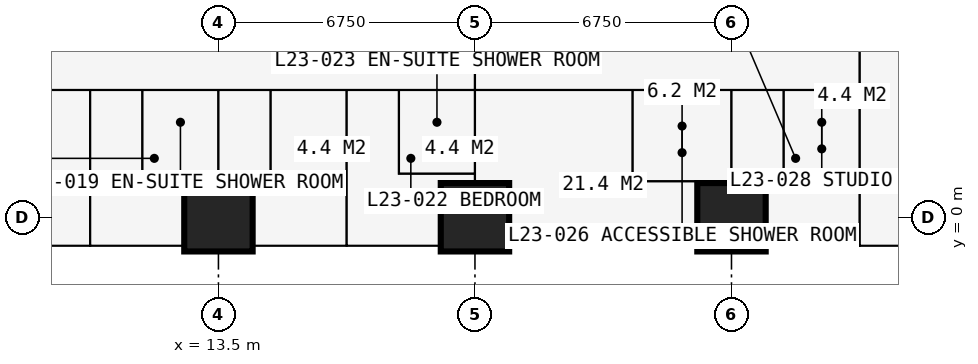
"""IFC4 building model, lengths in metres.
Left out: names, types, materials, properties, quantities, classifications, styles, units other than length and angle.
Written with IfcOpenShell. Run it as: python <this file> out.ifc"""

import sys

from ifc_helpers import new_model, si_unit, direction, frame, frame_2d, origin, origin_2d, place, context, subcontext, project, spatial, rectangle, extrude, element, fill, save


model = new_model("IFC4")
c1 = context("Model", 3, precision=1e-05, world=origin(), true_north=direction((0.0, 1.0)))
c2 = subcontext(c1, "Body", "Model", "MODEL_VIEW")
j1 = project(units=[si_unit("LENGTHUNIT", "METRE"), si_unit("PLANEANGLEUNIT", "RADIAN")], contexts=[c1])
p1 = place(None, origin())
s1 = spatial("IfcSite", under=j1, at=p1, CompositionType="ELEMENT")
p2 = place(p1, origin())
s2 = spatial("IfcBuilding", under=s1, at=p2, CompositionType="ELEMENT")
p3 = place(p2, frame((0.0, 0.0, 87.3)))
s3 = spatial("IfcBuildingStorey", under=s2, at=p3, CompositionType="ELEMENT", Elevation=87.3)
for number, where, z_axis, x_axis in (
    (1, (13.5, 0.0, 0.0), (0.0, 0.0, 1.0), (1.0, 0.0, 0.0)),
    (2, (20.25, 0.0, 0.0), (0.0, 0.0, 1.0), (1.0, 0.0, 0.0)),
    (3, (27.0, 0.0, 0.0), (0.0, 0.0, 1.0), (1.0, 0.0, 0.0)),
):
    element("IfcColumn", number, at=place(p3, frame(where, z_axis=z_axis, x_axis=x_axis)), inside=s3, PredefinedType="COLUMN", context=c2, shape_type="SweptSolid", body=[
        extrude(rectangle(XDim=1.8, YDim=1.8, at=origin_2d()), origin(), (0.0, 0.0, 1.0), 3.6),
    ])
p4 = place(p3, frame((20.25, -0.75, 0.0), z_axis=(0.0, 0.0, 1.0), x_axis=(-1.0, 0.0, 0.0)))
e4 = element("IfcWall", 4, at=p4, inside=s3, PredefinedType="SOLIDWALL", context=c2, shape_type="SweptSolid", body=[
    extrude(rectangle(XDim=6.75, YDim=0.15, at=frame_2d((3.375, 0.0))), origin(), (0.0, 0.0, 1.0), 3.375),
])
p5 = place(p4, frame((0.962, 0.0, 0.0)))
e5 = element("IfcOpeningElement", 5, at=p5, cuts=e4, PredefinedType="OPENING", context=c2, shape_type="SweptSolid", body=[
    extrude(rectangle(XDim=1.0, YDim=2.2, at=frame_2d((0.5, 1.1))), frame((0.0, 0.085, 0.0), z_axis=(0.0, -1.0, 0.0), x_axis=(1.0, 0.0, 0.0)), (0.0, 0.0, 1.0), 0.17),
])
p6 = place(p4, frame((2.025, 0.0, 0.9)))
e6 = element("IfcOpeningElement", 6, at=p6, cuts=e4, PredefinedType="OPENING", context=c2, shape_type="SweptSolid", body=[
    extrude(rectangle(XDim=1.2, YDim=1.8, at=frame_2d((0.6, 0.9))), frame((0.0, 0.085, 0.0), z_axis=(0.0, -1.0, 0.0), x_axis=(1.0, 0.0, 0.0)), (0.0, 0.0, 1.0), 0.17),
])
p7 = place(p4, frame((4.788, 0.0, 0.0)))
e7 = element("IfcOpeningElement", 7, at=p7, cuts=e4, PredefinedType="OPENING", context=c2, shape_type="SweptSolid", body=[
    extrude(rectangle(XDim=1.0, YDim=2.2, at=frame_2d((0.5, 1.1))), frame((0.0, 0.085, 0.0), z_axis=(0.0, -1.0, 0.0), x_axis=(1.0, 0.0, 0.0)), (0.0, 0.0, 1.0), 0.17),
])
p8 = place(p4, frame((3.525, 0.0, 0.9)))
e8 = element("IfcOpeningElement", 8, at=p8, cuts=e4, PredefinedType="OPENING", context=c2, shape_type="SweptSolid", body=[
    extrude(rectangle(XDim=1.2, YDim=1.8, at=frame_2d((0.6, 0.9))), frame((0.0, 0.085, 0.0), z_axis=(0.0, -1.0, 0.0), x_axis=(1.0, 0.0, 0.0)), (0.0, 0.0, 1.0), 0.17),
])
p9 = place(p3, frame((16.875, -0.85, 0.0), z_axis=(0.0, 0.0, 1.0), x_axis=(0.0, -1.0, 0.0)))
e9 = element("IfcWall", 9, at=p9, inside=s3, PredefinedType="USERDEFINED", context=c2, shape_type="SweptSolid", body=[
    extrude(rectangle(XDim=2.2, YDim=1.0, at=frame_2d((1.1, 0.0))), origin(), (0.0, 0.0, 1.0), 0.9),
])
p10 = place(p3, frame((6.75, 3.35, 0.0), z_axis=(0.0, 0.0, 1.0), x_axis=(1.0, 0.0, 0.0)))
e10 = element("IfcWall", 10, at=p10, inside=s3, PredefinedType="PARTITIONING", context=c2, shape_type="SweptSolid", body=[
    extrude(rectangle(XDim=23.625, YDim=0.1, at=frame_2d((11.812, 0.0))), origin(), (0.0, 0.0, 1.0), 3.375),
])
p11 = place(p10, frame((1.2, 0.0, 0.0)))
e11 = element("IfcOpeningElement", 11, at=p11, cuts=e10, PredefinedType="OPENING", context=c2, shape_type="SweptSolid", body=[
    extrude(rectangle(XDim=1.0, YDim=2.2, at=frame_2d((0.5, 1.1))), frame((0.0, 0.06, 0.0), z_axis=(0.0, -1.0, 0.0), x_axis=(1.0, 0.0, 0.0)), (0.0, 0.0, 1.0), 0.12),
])
p12 = place(p10, frame((3.575, 0.0, 0.0)))
e12 = element("IfcOpeningElement", 12, at=p12, cuts=e10, PredefinedType="OPENING", context=c2, shape_type="SweptSolid", body=[
    extrude(rectangle(XDim=0.95, YDim=2.2, at=frame_2d((0.475, 1.1))), frame((0.0, 0.06, 0.0), z_axis=(0.0, -1.0, 0.0), x_axis=(1.0, 0.0, 0.0)), (0.0, 0.0, 1.0), 0.12),
])
p13 = place(p10, frame((6.95, 0.0, 0.0)))
e13 = element("IfcOpeningElement", 13, at=p13, cuts=e10, PredefinedType="OPENING", context=c2, shape_type="SweptSolid", body=[
    extrude(rectangle(XDim=0.95, YDim=2.2, at=frame_2d((0.475, 1.1))), frame((0.0, 0.06, 0.0), z_axis=(0.0, -1.0, 0.0), x_axis=(1.0, 0.0, 0.0)), (0.0, 0.0, 1.0), 0.12),
])
p14 = place(p10, frame((10.325, 0.0, 0.0)))
e14 = element("IfcOpeningElement", 14, at=p14, cuts=e10, PredefinedType="OPENING", context=c2, shape_type="SweptSolid", body=[
    extrude(rectangle(XDim=0.95, YDim=2.2, at=frame_2d((0.475, 1.1))), frame((0.0, 0.06, 0.0), z_axis=(0.0, -1.0, 0.0), x_axis=(1.0, 0.0, 0.0)), (0.0, 0.0, 1.0), 0.12),
])
p15 = place(p10, frame((15.1, 0.0, 0.0)))
e15 = element("IfcOpeningElement", 15, at=p15, cuts=e10, PredefinedType="OPENING", context=c2, shape_type="SweptSolid", body=[
    extrude(rectangle(XDim=0.95, YDim=2.2, at=frame_2d((0.475, 1.1))), frame((0.0, 0.06, 0.0), z_axis=(0.0, -1.0, 0.0), x_axis=(1.0, 0.0, 0.0)), (0.0, 0.0, 1.0), 0.12),
])
p16 = place(p10, frame((20.45, 0.0, 0.0)))
e16 = element("IfcOpeningElement", 16, at=p16, cuts=e10, PredefinedType="OPENING", context=c2, shape_type="SweptSolid", body=[
    extrude(rectangle(XDim=0.95, YDim=2.2, at=frame_2d((0.475, 1.1))), frame((0.0, 0.06, 0.0), z_axis=(0.0, -1.0, 0.0), x_axis=(1.0, 0.0, 0.0)), (0.0, 0.0, 1.0), 0.12),
])
p17 = place(p3, frame((10.125, -0.734, 0.0), z_axis=(0.0, 0.0, 1.0), x_axis=(0.0, 1.0, 0.0)))
e17 = element("IfcWall", 17, at=p17, inside=s3, PredefinedType="PARTITIONING", context=c2, shape_type="SweptSolid", body=[
    extrude(rectangle(XDim=4.084, YDim=0.15, at=frame_2d((2.042, 0.0))), origin(), (0.0, 0.0, 1.0), 3.375),
])
p18 = place(p3, frame((11.5, 1.15, 0.0), z_axis=(0.0, 0.0, 1.0), x_axis=(0.0, 1.0, 0.0)))
e18 = element("IfcWall", 18, at=p18, inside=s3, PredefinedType="PARTITIONING", context=c2, shape_type="SweptSolid", body=[
    extrude(rectangle(XDim=2.2, YDim=0.1, at=frame_2d((1.1, 0.0))), origin(), (0.0, 0.0, 1.0), 3.375),
])
p19 = place(p18, frame((0.65, 0.0, 0.0)))
e19 = element("IfcOpeningElement", 19, at=p19, cuts=e18, PredefinedType="OPENING", context=c2, shape_type="SweptSolid", body=[
    extrude(rectangle(XDim=0.9, YDim=2.2, at=frame_2d((0.45, 1.1))), frame((0.0, 0.06, 0.0), z_axis=(0.0, -1.0, 0.0), x_axis=(1.0, 0.0, 0.0)), (0.0, 0.0, 1.0), 0.12),
])
p20 = place(p3, frame((11.5, 1.15, 0.0), z_axis=(0.0, 0.0, 1.0), x_axis=(1.0, 0.0, 0.0)))
e20 = element("IfcWall", 20, at=p20, inside=s3, PredefinedType="PARTITIONING", context=c2, shape_type="SweptSolid", body=[
    extrude(rectangle(XDim=2.0, YDim=0.1, at=frame_2d((1.0, 0.0))), origin(), (0.0, 0.0, 1.0), 3.375),
])
p21 = place(p3, frame((13.5, -0.734, 0.0), z_axis=(0.0, 0.0, 1.0), x_axis=(0.0, 1.0, 0.0)))
e21 = element("IfcWall", 21, at=p21, inside=s3, PredefinedType="PARTITIONING", context=c2, shape_type="SweptSolid", body=[
    extrude(rectangle(XDim=4.084, YDim=0.1, at=frame_2d((2.042, 0.0))), origin(), (0.0, 0.0, 1.0), 2.877),
])
p22 = place(p3, frame((14.875, 1.15, 0.0), z_axis=(0.0, 0.0, 1.0), x_axis=(0.0, 1.0, 0.0)))
e22 = element("IfcWall", 22, at=p22, inside=s3, PredefinedType="PARTITIONING", context=c2, shape_type="SweptSolid", body=[
    extrude(rectangle(XDim=2.2, YDim=0.1, at=frame_2d((1.1, 0.0))), origin(), (0.0, 0.0, 1.0), 3.375),
])
p23 = place(p22, frame((0.65, 0.0, 0.0)))
e23 = element("IfcOpeningElement", 23, at=p23, cuts=e22, PredefinedType="OPENING", context=c2, shape_type="SweptSolid", body=[
    extrude(rectangle(XDim=0.9, YDim=2.2, at=frame_2d((0.45, 1.1))), frame((0.0, 0.06, 0.0), z_axis=(0.0, -1.0, 0.0), x_axis=(1.0, 0.0, 0.0)), (0.0, 0.0, 1.0), 0.12),
])
p24 = place(p3, frame((14.875, 1.15, 0.0), z_axis=(0.0, 0.0, 1.0), x_axis=(1.0, 0.0, 0.0)))
e24 = element("IfcWall", 24, at=p24, inside=s3, PredefinedType="PARTITIONING", context=c2, shape_type="SweptSolid", body=[
    extrude(rectangle(XDim=2.0, YDim=0.1, at=frame_2d((1.0, 0.0))), origin(), (0.0, 0.0, 1.0), 3.375),
])
p25 = place(p3, frame((16.875, -0.734, 0.0), z_axis=(0.0, 0.0, 1.0), x_axis=(0.0, 1.0, 0.0)))
e25 = element("IfcWall", 25, at=p25, inside=s3, PredefinedType="PARTITIONING", context=c2, shape_type="SweptSolid", body=[
    extrude(rectangle(XDim=4.084, YDim=0.1, at=frame_2d((2.042, 0.0))), origin(), (0.0, 0.0, 1.0), 3.375),
])
p26 = place(p3, frame((18.25, 1.15, 0.0), z_axis=(0.0, 0.0, 1.0), x_axis=(0.0, 1.0, 0.0)))
e26 = element("IfcWall", 26, at=p26, inside=s3, PredefinedType="PARTITIONING", context=c2, shape_type="SweptSolid", body=[
    extrude(rectangle(XDim=2.2, YDim=0.1, at=frame_2d((1.1, 0.0))), origin(), (0.0, 0.0, 1.0), 3.375),
])
p27 = place(p26, frame((0.65, 0.0, 0.0)))
e27 = element("IfcOpeningElement", 27, at=p27, cuts=e26, PredefinedType="OPENING", context=c2, shape_type="SweptSolid", body=[
    extrude(rectangle(XDim=0.9, YDim=2.2, at=frame_2d((0.45, 1.1))), frame((0.0, 0.06, 0.0), z_axis=(0.0, -1.0, 0.0), x_axis=(1.0, 0.0, 0.0)), (0.0, 0.0, 1.0), 0.12),
])
p28 = place(p3, frame((18.25, 1.15, 0.0), z_axis=(0.0, 0.0, 1.0), x_axis=(1.0, 0.0, 0.0)))
e28 = element("IfcWall", 28, at=p28, inside=s3, PredefinedType="PARTITIONING", context=c2, shape_type="SweptSolid", body=[
    extrude(rectangle(XDim=2.0, YDim=0.1, at=frame_2d((1.0, 0.0))), origin(), (0.0, 0.0, 1.0), 3.375),
])
p29 = place(p3, frame((20.25, -0.734, 0.0), z_axis=(0.0, 0.0, 1.0), x_axis=(0.0, 1.0, 0.0)))
e29 = element("IfcWall", 29, at=p29, inside=s3, PredefinedType="PARTITIONING", context=c2, shape_type="SweptSolid", body=[
    extrude(rectangle(XDim=12.034, YDim=0.15, at=frame_2d((6.017, 0.0))), origin(), (0.0, 0.0, 1.0), 2.61),
])
p30 = place(p3, frame((24.4, 0.95, 0.0), z_axis=(0.0, 0.0, 1.0), x_axis=(0.0, 1.0, 0.0)))
e30 = element("IfcWall", 30, at=p30, inside=s3, PredefinedType="PARTITIONING", context=c2, shape_type="SweptSolid", body=[
    extrude(rectangle(XDim=2.4, YDim=0.1, at=frame_2d((1.2, 0.0))), origin(), (0.0, 0.0, 1.0), 3.375),
])
p31 = place(p3, frame((24.4, 0.95, 0.0), z_axis=(0.0, 0.0, 1.0), x_axis=(1.0, 0.0, 0.0)))
e31 = element("IfcWall", 31, at=p31, inside=s3, PredefinedType="PARTITIONING", context=c2, shape_type="SweptSolid", body=[
    extrude(rectangle(XDim=2.6, YDim=0.1, at=frame_2d((1.3, 0.0))), origin(), (0.0, 0.0, 1.0), 3.375),
])
p32 = place(p31, frame((0.8, 0.0, 0.0)))
e32 = element("IfcOpeningElement", 32, at=p32, cuts=e31, PredefinedType="OPENING", context=c2, shape_type="SweptSolid", body=[
    extrude(rectangle(XDim=0.9, YDim=2.2, at=frame_2d((0.45, 1.1))), frame((0.0, 0.06, 0.0), z_axis=(0.0, -1.0, 0.0), x_axis=(1.0, 0.0, 0.0)), (0.0, 0.0, 1.0), 0.12),
])
p33 = place(p3, frame((27.0, -0.734, 0.0), z_axis=(0.0, 0.0, 1.0), x_axis=(0.0, 1.0, 0.0)))
e33 = element("IfcWall", 33, at=p33, inside=s3, PredefinedType="PARTITIONING", context=c2, shape_type="SweptSolid", body=[
    extrude(rectangle(XDim=4.084, YDim=0.1, at=frame_2d((2.042, 0.0))), origin(), (0.0, 0.0, 1.0), 2.61),
])
p34 = place(p3, frame((28.375, 1.15, 0.0), z_axis=(0.0, 0.0, 1.0), x_axis=(0.0, 1.0, 0.0)))
e34 = element("IfcWall", 34, at=p34, inside=s3, PredefinedType="PARTITIONING", context=c2, shape_type="SweptSolid", body=[
    extrude(rectangle(XDim=2.2, YDim=0.1, at=frame_2d((1.1, 0.0))), origin(), (0.0, 0.0, 1.0), 3.375),
])
p35 = place(p34, frame((0.65, 0.0, 0.0)))
e35 = element("IfcOpeningElement", 35, at=p35, cuts=e34, PredefinedType="OPENING", context=c2, shape_type="SweptSolid", body=[
    extrude(rectangle(XDim=0.9, YDim=2.2, at=frame_2d((0.45, 1.1))), frame((0.0, 0.06, 0.0), z_axis=(0.0, -1.0, 0.0), x_axis=(1.0, 0.0, 0.0)), (0.0, 0.0, 1.0), 0.12),
])
p36 = place(p3, frame((28.375, 1.15, 0.0), z_axis=(0.0, 0.0, 1.0), x_axis=(1.0, 0.0, 0.0)))
e36 = element("IfcWall", 36, at=p36, inside=s3, PredefinedType="PARTITIONING", context=c2, shape_type="SweptSolid", body=[
    extrude(rectangle(XDim=2.0, YDim=0.1, at=frame_2d((1.0, 0.0))), origin(), (0.0, 0.0, 1.0), 3.375),
])
p37 = place(p3, frame((30.375, -0.734, 0.0), z_axis=(0.0, 0.0, 1.0), x_axis=(0.0, 1.0, 0.0)))
e37 = element("IfcWall", 37, at=p37, inside=s3, PredefinedType="PARTITIONING", context=c2, shape_type="SweptSolid", body=[
    extrude(rectangle(XDim=12.034, YDim=0.15, at=frame_2d((6.017, 0.0))), origin(), (0.0, 0.0, 1.0), 3.375),
])
p38 = place(p37, frame((4.884, 0.0, 0.0)))
e38 = element("IfcOpeningElement", 38, at=p38, cuts=e37, PredefinedType="OPENING", context=c2, shape_type="SweptSolid", body=[
    extrude(rectangle(XDim=1.0, YDim=2.2, at=frame_2d((0.5, 1.1))), frame((0.0, 0.085, 0.0), z_axis=(0.0, -1.0, 0.0), x_axis=(1.0, 0.0, 0.0)), (0.0, 0.0, 1.0), 0.17),
])
p39 = place(p5, origin())
e39 = element("IfcDoor", 39, at=p39, inside=s3, OperationType="SINGLE_SWING_LEFT", PredefinedType="DOOR", context=c2, shape_type="SweptSolid", body=[
    extrude(rectangle(XDim=1.0, YDim=2.2, at=frame_2d((0.5, 1.1))), frame((0.0, 0.025, 0.0), z_axis=(0.0, -1.0, 0.0), x_axis=(1.0, 0.0, 0.0)), (0.0, 0.0, 1.0), 0.05),
])
fill(e5, e39)
p40 = place(p6, origin())
e40 = element("IfcWindow", 40, at=p40, inside=s3, PartitioningType="SINGLE_PANEL", PredefinedType="WINDOW", context=c2, shape_type="SweptSolid", body=[
    extrude(rectangle(XDim=1.2, YDim=1.8, at=frame_2d((0.6, 0.9))), frame((0.0, 0.03, 0.0), z_axis=(0.0, -1.0, 0.0), x_axis=(1.0, 0.0, 0.0)), (0.0, 0.0, 1.0), 0.06),
])
fill(e6, e40)
p41 = place(p7, origin())
e41 = element("IfcDoor", 41, at=p41, inside=s3, OperationType="SINGLE_SWING_RIGHT", PredefinedType="DOOR", context=c2, shape_type="SweptSolid", body=[
    extrude(rectangle(XDim=1.0, YDim=2.2, at=frame_2d((0.5, 1.1))), frame((0.0, 0.025, 0.0), z_axis=(0.0, -1.0, 0.0), x_axis=(1.0, 0.0, 0.0)), (0.0, 0.0, 1.0), 0.05),
])
fill(e7, e41)
p42 = place(p8, origin())
e42 = element("IfcWindow", 42, at=p42, inside=s3, PartitioningType="SINGLE_PANEL", PredefinedType="WINDOW", context=c2, shape_type="SweptSolid", body=[
    extrude(rectangle(XDim=1.2, YDim=1.8, at=frame_2d((0.6, 0.9))), frame((0.0, 0.03, 0.0), z_axis=(0.0, -1.0, 0.0), x_axis=(1.0, 0.0, 0.0)), (0.0, 0.0, 1.0), 0.06),
])
fill(e8, e42)
p43 = place(p12, origin())
e43 = element("IfcDoor", 43, at=p43, inside=s3, OperationType="SINGLE_SWING_LEFT", PredefinedType="DOOR", context=c2, shape_type="SweptSolid", body=[
    extrude(rectangle(XDim=0.95, YDim=2.2, at=frame_2d((0.475, 1.1))), frame((0.0, 0.025, 0.0), z_axis=(0.0, -1.0, 0.0), x_axis=(1.0, 0.0, 0.0)), (0.0, 0.0, 1.0), 0.05),
])
fill(e12, e43)
p44 = place(p19, origin())
e44 = element("IfcDoor", 44, at=p44, inside=s3, OperationType="SINGLE_SWING_RIGHT", PredefinedType="DOOR", context=c2, shape_type="SweptSolid", body=[
    extrude(rectangle(XDim=0.9, YDim=2.2, at=frame_2d((0.45, 1.1))), frame((0.0, 0.025, 0.0), z_axis=(0.0, -1.0, 0.0), x_axis=(1.0, 0.0, 0.0)), (0.0, 0.0, 1.0), 0.05),
])
fill(e19, e44)
p45 = place(p13, origin())
e45 = element("IfcDoor", 45, at=p45, inside=s3, OperationType="SINGLE_SWING_LEFT", PredefinedType="DOOR", context=c2, shape_type="SweptSolid", body=[
    extrude(rectangle(XDim=0.95, YDim=2.2, at=frame_2d((0.475, 1.1))), frame((0.0, 0.025, 0.0), z_axis=(0.0, -1.0, 0.0), x_axis=(1.0, 0.0, 0.0)), (0.0, 0.0, 1.0), 0.05),
])
fill(e13, e45)
p46 = place(p23, origin())
e46 = element("IfcDoor", 46, at=p46, inside=s3, OperationType="SINGLE_SWING_RIGHT", PredefinedType="DOOR", context=c2, shape_type="SweptSolid", body=[
    extrude(rectangle(XDim=0.9, YDim=2.2, at=frame_2d((0.45, 1.1))), frame((0.0, 0.025, 0.0), z_axis=(0.0, -1.0, 0.0), x_axis=(1.0, 0.0, 0.0)), (0.0, 0.0, 1.0), 0.05),
])
fill(e23, e46)
p47 = place(p14, origin())
e47 = element("IfcDoor", 47, at=p47, inside=s3, OperationType="SINGLE_SWING_LEFT", PredefinedType="DOOR", context=c2, shape_type="SweptSolid", body=[
    extrude(rectangle(XDim=0.95, YDim=2.2, at=frame_2d((0.475, 1.1))), frame((0.0, 0.025, 0.0), z_axis=(0.0, -1.0, 0.0), x_axis=(1.0, 0.0, 0.0)), (0.0, 0.0, 1.0), 0.05),
])
fill(e14, e47)
p48 = place(p27, origin())
e48 = element("IfcDoor", 48, at=p48, inside=s3, OperationType="SINGLE_SWING_RIGHT", PredefinedType="DOOR", context=c2, shape_type="SweptSolid", body=[
    extrude(rectangle(XDim=0.9, YDim=2.2, at=frame_2d((0.45, 1.1))), frame((0.0, 0.025, 0.0), z_axis=(0.0, -1.0, 0.0), x_axis=(1.0, 0.0, 0.0)), (0.0, 0.0, 1.0), 0.05),
])
fill(e27, e48)
p49 = place(p15, origin())
e49 = element("IfcDoor", 49, at=p49, inside=s3, OperationType="SINGLE_SWING_LEFT", PredefinedType="DOOR", context=c2, shape_type="SweptSolid", body=[
    extrude(rectangle(XDim=0.95, YDim=2.2, at=frame_2d((0.475, 1.1))), frame((0.0, 0.025, 0.0), z_axis=(0.0, -1.0, 0.0), x_axis=(1.0, 0.0, 0.0)), (0.0, 0.0, 1.0), 0.05),
])
fill(e15, e49)
p50 = place(p32, origin())
e50 = element("IfcDoor", 50, at=p50, inside=s3, OperationType="SINGLE_SWING_RIGHT", PredefinedType="DOOR", context=c2, shape_type="SweptSolid", body=[
    extrude(rectangle(XDim=0.9, YDim=2.2, at=frame_2d((0.45, 1.1))), frame((0.0, 0.025, 0.0), z_axis=(0.0, -1.0, 0.0), x_axis=(1.0, 0.0, 0.0)), (0.0, 0.0, 1.0), 0.05),
])
fill(e32, e50)
p51 = place(p16, origin())
e51 = element("IfcDoor", 51, at=p51, inside=s3, OperationType="SINGLE_SWING_LEFT", PredefinedType="DOOR", context=c2, shape_type="SweptSolid", body=[
    extrude(rectangle(XDim=0.95, YDim=2.2, at=frame_2d((0.475, 1.1))), frame((0.0, 0.025, 0.0), z_axis=(0.0, -1.0, 0.0), x_axis=(1.0, 0.0, 0.0)), (0.0, 0.0, 1.0), 0.05),
])
fill(e16, e51)
p52 = place(p35, origin())
e52 = element("IfcDoor", 52, at=p52, inside=s3, OperationType="SINGLE_SWING_RIGHT", PredefinedType="DOOR", context=c2, shape_type="SweptSolid", body=[
    extrude(rectangle(XDim=0.9, YDim=2.2, at=frame_2d((0.45, 1.1))), frame((0.0, 0.025, 0.0), z_axis=(0.0, -1.0, 0.0), x_axis=(1.0, 0.0, 0.0)), (0.0, 0.0, 1.0), 0.05),
])
fill(e35, e52)
p53 = place(p38, origin())
e53 = element("IfcDoor", 53, at=p53, inside=s3, OperationType="SINGLE_SWING_LEFT", PredefinedType="DOOR", context=c2, shape_type="SweptSolid", body=[
    extrude(rectangle(XDim=1.0, YDim=2.2, at=frame_2d((0.5, 1.1))), frame((0.0, 0.025, 0.0), z_axis=(0.0, -1.0, 0.0), x_axis=(1.0, 0.0, 0.0)), (0.0, 0.0, 1.0), 0.05),
])
fill(e38, e53)
save(model, sys.argv[1])
